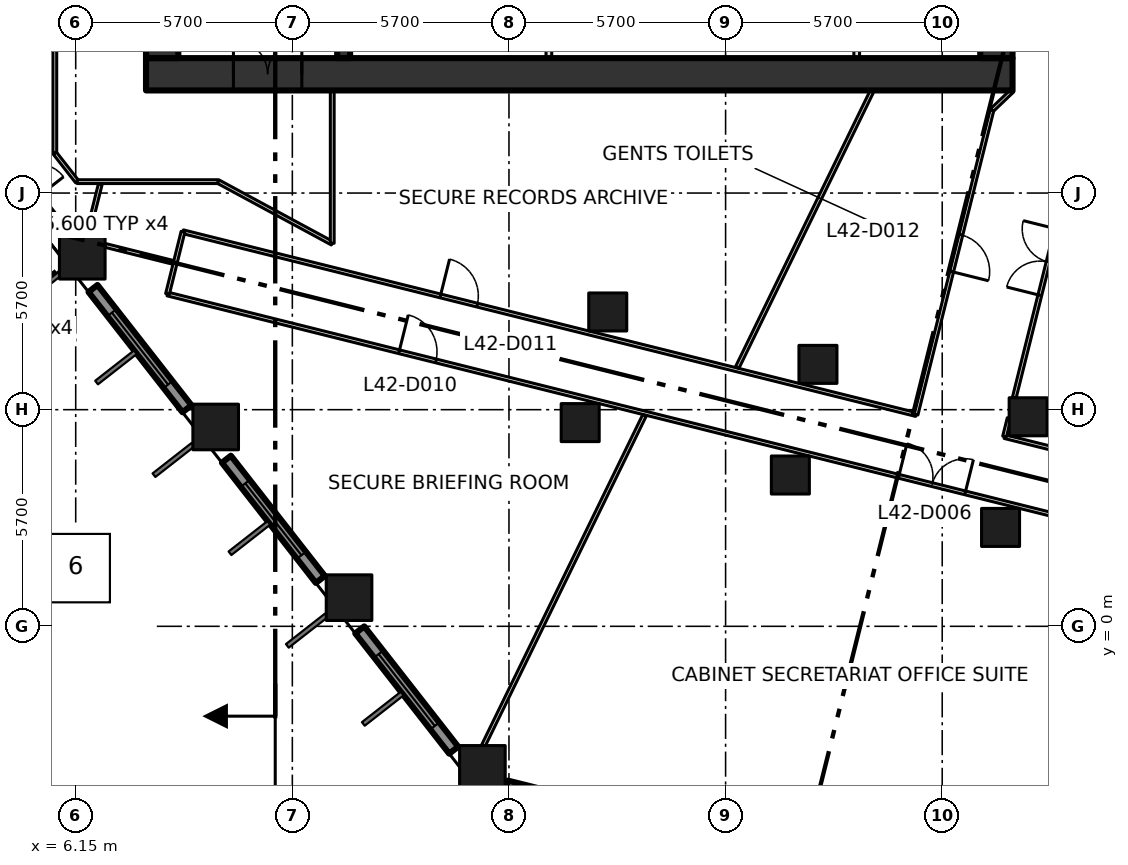
"""IFC4 building model, lengths in metres.
Left out: names, types, materials, properties, quantities, classifications, styles, units other than length and angle.
Written with IfcOpenShell. Run it as: python <this file> out.ifc"""

import sys

from ifc_helpers import new_model, si_unit, direction, frame, frame_2d, origin, origin_2d, place, context, subcontext, project, spatial, rectangle, extrude, element, fill, save


model = new_model("IFC4")
c1 = context("Model", 3, precision=1e-05, world=origin(), true_north=direction((0.0, 1.0)))
c2 = subcontext(c1, "Body", "Model", "MODEL_VIEW")
j1 = project(units=[si_unit("LENGTHUNIT", "METRE"), si_unit("PLANEANGLEUNIT", "RADIAN")], contexts=[c1])
p1 = place(None, origin())
s1 = spatial("IfcSite", under=j1, at=p1, CompositionType="ELEMENT")
p2 = place(p1, origin())
s2 = spatial("IfcBuilding", under=s1, at=p2, CompositionType="ELEMENT")
p3 = place(p2, frame((0.0, 0.0, 186.6)))
s3 = spatial("IfcBuildingStorey", under=s2, at=p3, CompositionType="ELEMENT", Elevation=186.6)
for number, where, z_axis, x_axis in (
    (1, (16.851, -3.738, 0.0), (0.0, 0.0, 1.0), (1.0, 0.0, 0.0)),
    (2, (13.342, 0.754, 0.0), (0.0, 0.0, 1.0), (1.0, 0.0, 0.0)),
    (3, (9.833, 5.245, 0.0), (0.0, 0.0, 1.0), (1.0, 0.0, 0.0)),
    (4, (6.323, 9.737, 0.0), (0.0, 0.0, 1.0), (1.0, 0.0, 0.0)),
):
    element("IfcColumn", number, at=place(p3, frame(where, z_axis=z_axis, x_axis=x_axis)), inside=s3, PredefinedType="COLUMN", context=c2, shape_type="SweptSolid", body=[
        extrude(rectangle(XDim=1.2, YDim=1.2, at=origin_2d()), origin(), (0.0, 0.0, 1.0), 4.2),
    ])
for number, where, z_axis, x_axis in (
    (5, (19.424, 5.36, 0.0), (0.0, 0.0, 1.0), (1.0, 0.0, 0.0)),
    (6, (24.954, 3.981, 0.0), (0.0, 0.0, 1.0), (1.0, 0.0, 0.0)),
    (7, (30.485, 2.602, 0.0), (0.0, 0.0, 1.0), (1.0, 0.0, 0.0)),
    (8, (20.149, 8.271, 0.0), (0.0, 0.0, 1.0), (1.0, 0.0, 0.0)),
    (9, (25.68, 6.892, 0.0), (0.0, 0.0, 1.0), (1.0, 0.0, 0.0)),
    (10, (31.211, 5.513, 0.0), (0.0, 0.0, 1.0), (1.0, 0.0, 0.0)),
):
    element("IfcColumn", number, at=place(p3, frame(where, z_axis=z_axis, x_axis=x_axis)), inside=s3, PredefinedType="COLUMN", context=c2, shape_type="SweptSolid", body=[
        extrude(rectangle(XDim=1.0, YDim=1.0, at=origin_2d()), origin(), (0.0, 0.0, 1.0), 4.2),
    ])
p4 = place(p3, frame((8.0, 14.525, -0.3), z_axis=(0.0, 0.0, 1.0), x_axis=(1.0, 0.0, 0.0)))
e11 = element("IfcWall", 11, at=p4, inside=s3, PredefinedType="SHEAR", context=c2, shape_type="SweptSolid", body=[
    extrude(rectangle(XDim=22.8, YDim=0.85, at=frame_2d((11.4, 0.0))), origin(), (0.0, 0.0, 1.0), 4.2),
])
p5 = place(p4, frame((2.3, 0.0, 0.3)))
e12 = element("IfcOpeningElement", 12, at=p5, cuts=e11, PredefinedType="OPENING", context=c2, shape_type="SweptSolid", body=[
    extrude(rectangle(XDim=1.8, YDim=2.1, at=frame_2d((0.9, 1.05))), frame((0.0, 0.435, 0.0), z_axis=(0.0, -1.0, 0.0), x_axis=(1.0, 0.0, 0.0)), (0.0, 0.0, 1.0), 0.87),
])
for number, where, z_axis, x_axis in (
    (13, (8.425, 14.95, -0.3), (0.0, 0.0, 1.0), (0.0, 1.0, 0.0)),
    (14, (30.375, 14.95, -0.3), (0.0, 0.0, 1.0), (0.0, 1.0, 0.0)),
):
    element("IfcWall", number, at=place(p3, frame(where, z_axis=z_axis, x_axis=x_axis)), inside=s3, PredefinedType="SHEAR", context=c2, shape_type="SweptSolid", body=[
        extrude(rectangle(XDim=20.75, YDim=0.85, at=frame_2d((10.375, 0.0))), origin(), (0.0, 0.0, 1.0), 4.2),
    ])
p6 = place(p3, frame((13.2, 14.95, 0.0), z_axis=(0.0, 0.0, 1.0), x_axis=(0.0, 1.0, 0.0)))
e15 = element("IfcWall", 15, at=p6, inside=s3, PredefinedType="SHEAR", context=c2, shape_type="SweptSolid", body=[
    extrude(rectangle(XDim=20.75, YDim=0.34, at=frame_2d((10.375, 0.0))), origin(), (0.0, 0.0, 1.0), 3.9),
])
p7 = place(p6, frame((3.35, 0.0, 0.0)))
e16 = element("IfcOpeningElement", 16, at=p7, cuts=e15, PredefinedType="OPENING", context=c2, shape_type="SweptSolid", body=[
    extrude(rectangle(XDim=1.8, YDim=2.1, at=frame_2d((0.9, 1.05))), frame((0.0, 0.18, 0.0), z_axis=(0.0, -1.0, 0.0), x_axis=(1.0, 0.0, 0.0)), (0.0, 0.0, 1.0), 0.36),
])
p8 = place(p6, frame((11.45, 0.0, 0.0)))
e17 = element("IfcOpeningElement", 17, at=p8, cuts=e15, PredefinedType="OPENING", context=c2, shape_type="SweptSolid", body=[
    extrude(rectangle(XDim=1.2, YDim=2.1, at=frame_2d((0.6, 1.05))), frame((0.0, 0.18, 0.0), z_axis=(0.0, -1.0, 0.0), x_axis=(1.0, 0.0, 0.0)), (0.0, 0.0, 1.0), 0.36),
])
for number, where, z_axis, x_axis in (
    (18, (18.6, 14.95, 0.0), (0.0, 0.0, 1.0), (0.0, 1.0, 0.0)),
    (19, (26.7, 14.95, 0.0), (0.0, 0.0, 1.0), (0.0, 1.0, 0.0)),
):
    element("IfcWall", number, at=place(p3, frame(where, z_axis=z_axis, x_axis=x_axis)), inside=s3, PredefinedType="PARTITIONING", context=c2, shape_type="SweptSolid", body=[
        extrude(rectangle(XDim=2.675, YDim=0.15, at=frame_2d((1.337, 0.0))), origin(), (0.0, 0.0, 1.0), 3.9),
    ])
p9 = place(p3, frame((3.283, 13.629, 0.0), z_axis=(0.0, 0.0, 1.0), x_axis=(0.615666723149, -0.78800665353, 0.0)))
e20 = element("IfcWall", 20, at=p9, inside=s3, PredefinedType="SOLIDWALL", context=c2, shape_type="SweptSolid", body=[
    extrude(rectangle(XDim=4.178, YDim=0.2, at=frame_2d((2.089, 0.0))), origin(), (0.0, 0.0, 1.0), 3.15),
])
p10 = place(p9, frame((1.188, 0.0, 0.0)))
e21 = element("IfcOpeningElement", 21, at=p10, cuts=e20, PredefinedType="OPENING", context=c2, shape_type="SweptSolid", body=[
    extrude(rectangle(XDim=1.8, YDim=2.9, at=frame_2d((0.9, 1.45))), frame((0.0, 0.11, 0.0), z_axis=(0.0, -1.0, 0.0), x_axis=(1.0, 0.0, 0.0)), (0.0, 0.0, 1.0), 0.22),
])
p11 = place(p3, frame((6.605, 8.889, 0.0), z_axis=(0.0, 0.0, 1.0), x_axis=(0.615706559089, -0.787975528233, 0.0)))
e22 = element("IfcWall", 22, at=p11, inside=s3, PredefinedType="SOLIDWALL", context=c2, shape_type="SweptSolid", body=[
    extrude(rectangle(XDim=4.016, YDim=0.3, at=frame_2d((2.008, 0.0))), origin(), (0.0, 0.0, 1.0), 3.15),
])
p12 = place(p11, frame((0.808, 0.0, 0.8)))
e23 = element("IfcOpeningElement", 23, at=p12, cuts=e22, PredefinedType="OPENING", context=c2, shape_type="SweptSolid", body=[
    extrude(rectangle(XDim=2.4, YDim=2.1, at=frame_2d((1.2, 1.05))), frame((0.0, 0.16, 0.0), z_axis=(0.0, -1.0, 0.0), x_axis=(1.0, 0.0, 0.0)), (0.0, 0.0, 1.0), 0.32),
])
p13 = place(p3, frame((10.115, 4.397, 0.0), z_axis=(0.0, 0.0, 1.0), x_axis=(0.615644041972, -0.788024373725, 0.0)))
e24 = element("IfcWall", 24, at=p13, inside=s3, PredefinedType="SOLIDWALL", context=c2, shape_type="SweptSolid", body=[
    extrude(rectangle(XDim=4.015, YDim=0.3, at=frame_2d((2.008, 0.0))), origin(), (0.0, 0.0, 1.0), 3.15),
])
p14 = place(p13, frame((0.807, 0.0, 0.8)))
e25 = element("IfcOpeningElement", 25, at=p14, cuts=e24, PredefinedType="OPENING", context=c2, shape_type="SweptSolid", body=[
    extrude(rectangle(XDim=2.4, YDim=2.1, at=frame_2d((1.2, 1.05))), frame((0.0, 0.16, 0.0), z_axis=(0.0, -1.0, 0.0), x_axis=(1.0, 0.0, 0.0)), (0.0, 0.0, 1.0), 0.32),
])
p15 = place(p3, frame((13.624, -0.094, 0.0), z_axis=(0.0, 0.0, 1.0), x_axis=(0.615526062586, -0.7881165309, 0.0)))
e26 = element("IfcWall", 26, at=p15, inside=s3, PredefinedType="SOLIDWALL", context=c2, shape_type="SweptSolid", body=[
    extrude(rectangle(XDim=4.016, YDim=0.3, at=frame_2d((2.008, 0.0))), origin(), (0.0, 0.0, 1.0), 3.15),
])
p16 = place(p15, frame((0.808, 0.0, 0.8)))
e27 = element("IfcOpeningElement", 27, at=p16, cuts=e26, PredefinedType="OPENING", context=c2, shape_type="SweptSolid", body=[
    extrude(rectangle(XDim=2.4, YDim=2.1, at=frame_2d((1.2, 1.05))), frame((0.0, 0.16, 0.0), z_axis=(0.0, -1.0, 0.0), x_axis=(1.0, 0.0, 0.0)), (0.0, 0.0, 1.0), 0.32),
])
p17 = place(p3, frame((17.484, -4.205, 0.0), z_axis=(0.0, 0.0, 1.0), x_axis=(0.970318118028, -0.241832069473, 0.0)))
e28 = element("IfcWall", 28, at=p17, inside=s3, PredefinedType="SOLIDWALL", context=c2, shape_type="SweptSolid", body=[
    extrude(rectangle(XDim=4.246, YDim=0.3, at=frame_2d((2.123, 0.0))), origin(), (0.0, 0.0, 1.0), 3.15),
])
p18 = place(p17, frame((0.923, 0.0, 0.8)))
e29 = element("IfcOpeningElement", 29, at=p18, cuts=e28, PredefinedType="OPENING", context=c2, shape_type="SweptSolid", body=[
    extrude(rectangle(XDim=2.4, YDim=2.1, at=frame_2d((1.2, 1.05))), frame((0.0, 0.16, 0.0), z_axis=(0.0, -1.0, 0.0), x_axis=(1.0, 0.0, 0.0)), (0.0, 0.0, 1.0), 0.32),
])
p19 = place(p3, frame((5.6, 12.451, 0.0), z_axis=(0.0, 0.0, 1.0), x_axis=(0.0, 1.0, 0.0)))
e30 = element("IfcWall", 30, at=p19, inside=s3, PredefinedType="PARTITIONING", context=c2, shape_type="SweptSolid", body=[
    extrude(rectangle(XDim=26.699, YDim=0.1, at=frame_2d((13.35, 0.0))), origin(), (0.0, 0.0, 1.0), 3.9),
])
p20 = place(p19, frame((7.17, 0.0, 0.0)))
e31 = element("IfcOpeningElement", 31, at=p20, cuts=e30, PredefinedType="OPENING", context=c2, shape_type="SweptSolid", body=[
    extrude(rectangle(XDim=1.0, YDim=2.1, at=frame_2d((0.5, 1.05))), frame((0.0, 0.06, 0.0), z_axis=(0.0, -1.0, 0.0), x_axis=(1.0, 0.0, 0.0)), (0.0, 0.0, 1.0), 0.12),
])
p21 = place(p19, frame((20.569, 0.0, 0.0)))
e32 = element("IfcOpeningElement", 32, at=p21, cuts=e30, PredefinedType="OPENING", context=c2, shape_type="SweptSolid", body=[
    extrude(rectangle(XDim=1.0, YDim=2.1, at=frame_2d((0.5, 1.05))), frame((0.0, 0.06, 0.0), z_axis=(0.0, -1.0, 0.0), x_axis=(1.0, 0.0, 0.0)), (0.0, 0.0, 1.0), 0.12),
])
p22 = place(p19, frame((24.979, 0.0, 0.0)))
e33 = element("IfcOpeningElement", 33, at=p22, cuts=e30, PredefinedType="OPENING", context=c2, shape_type="SweptSolid", body=[
    extrude(rectangle(XDim=1.0, YDim=2.1, at=frame_2d((0.5, 1.05))), frame((0.0, 0.06, 0.0), z_axis=(0.0, -1.0, 0.0), x_axis=(1.0, 0.0, 0.0)), (0.0, 0.0, 1.0), 0.12),
])
p23 = place(p3, frame((5.6, 12.451, 0.0), z_axis=(0.0, 0.0, 1.0), x_axis=(0.615783213621, -0.787915626081, 0.0)))
e34 = element("IfcWall", 34, at=p23, inside=s3, PredefinedType="PARTITIONING", context=c2, shape_type="SweptSolid", body=[
    extrude(rectangle(XDim=0.953, YDim=0.1, at=frame_2d((0.477, 0.0))), origin(), (0.0, 0.0, 1.0), 3.9),
])
p24 = place(p3, frame((6.187, 11.7, 0.0), z_axis=(0.0, 0.0, 1.0), x_axis=(1.0, 0.0, 0.0)))
e35 = element("IfcWall", 35, at=p24, inside=s3, PredefinedType="PARTITIONING", context=c2, shape_type="SweptSolid", body=[
    extrude(rectangle(XDim=3.713, YDim=0.1, at=frame_2d((1.856, 0.0))), origin(), (0.0, 0.0, 1.0), 3.9),
])
p25 = place(p3, frame((8.565, 8.744, 0.0), z_axis=(0.0, 0.0, 1.0), x_axis=(0.97029693432, -0.24191705035, 0.0)))
e36 = element("IfcWall", 36, at=p25, inside=s3, PredefinedType="PARTITIONING", context=c2, shape_type="SweptSolid", body=[
    extrude(rectangle(XDim=56.375, YDim=0.1, at=frame_2d((28.187, 0.0))), origin(), (0.0, 0.0, 1.0), 3.9),
])
p26 = place(p25, frame((37.03, 0.0, 0.0)))
e37 = element("IfcOpeningElement", 37, at=p26, cuts=e36, PredefinedType="OPENING", context=c2, shape_type="SweptSolid", body=[
    extrude(rectangle(XDim=1.8, YDim=2.1, at=frame_2d((0.9, 1.05))), frame((0.0, 0.06, 0.0), z_axis=(0.0, -1.0, 0.0), x_axis=(1.0, 0.0, 0.0)), (0.0, 0.0, 1.0), 0.12),
])
p27 = place(p25, frame((42.83, 0.0, 0.0)))
e38 = element("IfcOpeningElement", 38, at=p27, cuts=e36, PredefinedType="OPENING", context=c2, shape_type="SweptSolid", body=[
    extrude(rectangle(XDim=1.0, YDim=2.1, at=frame_2d((0.5, 1.05))), frame((0.0, 0.06, 0.0), z_axis=(0.0, -1.0, 0.0), x_axis=(1.0, 0.0, 0.0)), (0.0, 0.0, 1.0), 0.12),
])
p28 = place(p25, frame((19.831, 0.0, 0.0)))
e39 = element("IfcOpeningElement", 39, at=p28, cuts=e36, PredefinedType="OPENING", context=c2, shape_type="SweptSolid", body=[
    extrude(rectangle(XDim=1.8, YDim=2.1, at=frame_2d((0.9, 1.05))), frame((0.0, 0.06, 0.0), z_axis=(0.0, -1.0, 0.0), x_axis=(1.0, 0.0, 0.0)), (0.0, 0.0, 1.0), 0.12),
])
p29 = place(p25, frame((25.631, 0.0, 0.0)))
e40 = element("IfcOpeningElement", 40, at=p29, cuts=e36, PredefinedType="OPENING", context=c2, shape_type="SweptSolid", body=[
    extrude(rectangle(XDim=1.0, YDim=2.1, at=frame_2d((0.5, 1.05))), frame((0.0, 0.06, 0.0), z_axis=(0.0, -1.0, 0.0), x_axis=(1.0, 0.0, 0.0)), (0.0, 0.0, 1.0), 0.12),
])
p30 = place(p25, frame((6.28, 0.0, 0.0)))
e41 = element("IfcOpeningElement", 41, at=p30, cuts=e36, PredefinedType="OPENING", context=c2, shape_type="SweptSolid", body=[
    extrude(rectangle(XDim=1.0, YDim=2.1, at=frame_2d((0.5, 1.05))), frame((0.0, 0.06, 0.0), z_axis=(0.0, -1.0, 0.0), x_axis=(1.0, 0.0, 0.0)), (0.0, 0.0, 1.0), 0.12),
])
p31 = place(p3, frame((8.973, 10.382, 0.0), z_axis=(0.0, 0.0, 1.0), x_axis=(0.970286808807, -0.241957658808, 0.0)))
e42 = element("IfcWall", 42, at=p31, inside=s3, PredefinedType="PARTITIONING", context=c2, shape_type="SweptSolid", body=[
    extrude(rectangle(XDim=19.88, YDim=0.1, at=frame_2d((9.94, 0.0))), origin(), (0.0, 0.0, 1.0), 3.9),
])
p32 = place(p31, frame((6.98, 0.0, 0.0)))
e43 = element("IfcOpeningElement", 43, at=p32, cuts=e42, PredefinedType="OPENING", context=c2, shape_type="SweptSolid", body=[
    extrude(rectangle(XDim=1.0, YDim=2.1, at=frame_2d((0.5, 1.05))), frame((0.0, 0.06, 0.0), z_axis=(0.0, -1.0, 0.0), x_axis=(1.0, 0.0, 0.0)), (0.0, 0.0, 1.0), 0.12),
])
p33 = place(p3, frame((8.973, 10.382, 0.0), z_axis=(0.0, 0.0, 1.0), x_axis=(-0.241650823739, -0.970363271866, 0.0)))
e44 = element("IfcWall", 44, at=p33, inside=s3, PredefinedType="PARTITIONING", context=c2, shape_type="SweptSolid", body=[
    extrude(rectangle(XDim=1.688, YDim=0.1, at=frame_2d((0.844, 0.0))), origin(), (0.0, 0.0, 1.0), 3.9),
])
p34 = place(p3, frame((9.9, 11.7, 0.0), z_axis=(0.0, 0.0, 1.0), x_axis=(0.87965147249, -0.475618846291, 0.0)))
e45 = element("IfcWall", 45, at=p34, inside=s3, PredefinedType="PARTITIONING", context=c2, shape_type="SweptSolid", body=[
    extrude(rectangle(XDim=3.41, YDim=0.1, at=frame_2d((1.705, 0.0))), origin(), (0.0, 0.0, 1.0), 3.9),
])
p35 = place(p3, frame((12.9, 10.078, 0.0), z_axis=(0.0, 0.0, 1.0), x_axis=(0.0, 1.0, 0.0)))
e46 = element("IfcWall", 46, at=p35, inside=s3, PredefinedType="PARTITIONING", context=c2, shape_type="SweptSolid", body=[
    extrude(rectangle(XDim=4.022, YDim=0.1, at=frame_2d((2.011, 0.0))), origin(), (0.0, 0.0, 1.0), 3.9),
])
p36 = place(p3, frame((30.259, 13.583, 0.0), z_axis=(0.0, 0.0, 1.0), x_axis=(-0.241888494143, -0.970304053584, 0.0)))
e47 = element("IfcWall", 47, at=p36, inside=s3, PredefinedType="PARTITIONING", context=c2, shape_type="SweptSolid", body=[
    extrude(rectangle(XDim=8.256, YDim=0.1, at=frame_2d((4.128, 0.0))), origin(), (0.0, 0.0, 1.0), 3.9),
])
p37 = place(p36, frame((3.38, 0.0, 0.0)))
e48 = element("IfcOpeningElement", 48, at=p37, cuts=e47, PredefinedType="OPENING", context=c2, shape_type="SweptSolid", body=[
    extrude(rectangle(XDim=1.0, YDim=2.1, at=frame_2d((0.5, 1.05))), frame((0.0, 0.06, 0.0), z_axis=(0.0, -1.0, 0.0), x_axis=(1.0, 0.0, 0.0)), (0.0, 0.0, 1.0), 0.12),
])
p38 = place(p3, frame((30.59, 4.992, 0.0), z_axis=(0.0, 0.0, 1.0), x_axis=(0.97028916255, -0.241948219746, 0.0)))
e49 = element("IfcWall", 49, at=p38, inside=s3, PredefinedType="PARTITIONING", context=c2, shape_type="SweptSolid", body=[
    extrude(rectangle(XDim=25.526, YDim=0.1, at=frame_2d((12.763, 0.0))), origin(), (0.0, 0.0, 1.0), 3.9),
])
p39 = place(p38, frame((20.101, 0.0, 0.0)))
e50 = element("IfcOpeningElement", 50, at=p39, cuts=e49, PredefinedType="OPENING", context=c2, shape_type="SweptSolid", body=[
    extrude(rectangle(XDim=1.0, YDim=2.1, at=frame_2d((0.5, 1.05))), frame((0.0, 0.06, 0.0), z_axis=(0.0, -1.0, 0.0), x_axis=(1.0, 0.0, 0.0)), (0.0, 0.0, 1.0), 0.12),
])
p40 = place(p3, frame((30.59, 4.992, 0.0), z_axis=(0.0, 0.0, 1.0), x_axis=(0.241731207299, 0.970343250308, 0.0)))
e51 = element("IfcWall", 51, at=p40, inside=s3, PredefinedType="PARTITIONING", context=c2, shape_type="SweptSolid", body=[
    extrude(rectangle(XDim=0.5, YDim=0.1, at=frame_2d((0.25, 0.0))), origin(), (0.0, 0.0, 1.0), 3.9),
])
p41 = place(p3, frame((30.8, 14.1, 0.0), z_axis=(0.0, 0.0, 1.0), x_axis=(-0.722911025189, -0.690941133281, 0.0)))
e52 = element("IfcWall", 52, at=p41, inside=s3, PredefinedType="PARTITIONING", context=c2, shape_type="SweptSolid", body=[
    extrude(rectangle(XDim=0.748, YDim=0.1, at=frame_2d((0.374, 0.0))), origin(), (0.0, 0.0, 1.0), 3.9),
])
p42 = place(p3, frame((30.845, 6.013, 0.0), z_axis=(0.0, 0.0, 1.0), x_axis=(0.241969354343, 0.97028389225, 0.0)))
e53 = element("IfcWall", 53, at=p42, inside=s3, PredefinedType="PARTITIONING", context=c2, shape_type="SweptSolid", body=[
    extrude(rectangle(XDim=7.203, YDim=0.1, at=frame_2d((3.602, 0.0))), origin(), (0.0, 0.0, 1.0), 3.9),
])
p43 = place(p42, frame((2.78, 0.0, 0.0)))
e54 = element("IfcOpeningElement", 54, at=p43, cuts=e53, PredefinedType="OPENING", context=c2, shape_type="SweptSolid", body=[
    extrude(rectangle(XDim=1.8, YDim=2.1, at=frame_2d((0.9, 1.05))), frame((0.0, 0.06, 0.0), z_axis=(0.0, -1.0, 0.0), x_axis=(1.0, 0.0, 0.0)), (0.0, 0.0, 1.0), 0.12),
])
p44 = place(p3, frame((6.797, 11.638, 0.0), z_axis=(0.0, 0.0, 1.0), x_axis=(-0.242492789119, -0.97015320812, 0.0)))
e55 = element("IfcWall", 55, at=p44, inside=s3, PredefinedType="PARTITIONING", context=c2, shape_type="SweptSolid", body=[
    extrude(rectangle(XDim=1.341, YDim=0.1, at=frame_2d((0.67, 0.0))), origin(), (0.0, 0.0, 1.0), 3.9),
])
p45 = place(p3, frame((8.72, 9.574, 0.0), z_axis=(0.0, 0.0, 1.0), x_axis=(-0.97017350799, 0.242411559945, 0.0)))
e56 = element("IfcWall", 56, at=p45, inside=s3, PredefinedType="PARTITIONING", context=c2, shape_type="SweptSolid", body=[
    extrude(rectangle(XDim=1.852, YDim=0.1, at=frame_2d((0.926, 0.0))), origin(), (0.0, 0.0, 1.0), 3.9),
])
p46 = place(p3, frame((16.877, -3.138, 0.0), z_axis=(0.0, 0.0, 1.0), x_axis=(0.438466907108, 0.898747334556, 0.0)))
e57 = element("IfcWall", 57, at=p46, inside=s3, PredefinedType="PARTITIONING", context=c2, shape_type="SweptSolid", body=[
    extrude(rectangle(XDim=9.67, YDim=0.1, at=frame_2d((4.835, 0.0))), origin(), (0.0, 0.0, 1.0), 3.9),
])
p47 = place(p3, frame((23.555, 6.808, 0.0), z_axis=(0.0, 0.0, 1.0), x_axis=(0.438332324522, 0.898812980146, 0.0)))
e58 = element("IfcWall", 58, at=p47, inside=s3, PredefinedType="PARTITIONING", context=c2, shape_type="SweptSolid", body=[
    extrude(rectangle(XDim=8.113, YDim=0.1, at=frame_2d((4.056, 0.0))), origin(), (0.0, 0.0, 1.0), 3.9),
])
p48 = place(p5, origin())
e59 = element("IfcDoor", 59, at=p48, inside=s3, OperationType="DOUBLE_DOOR_SINGLE_SWING", PredefinedType="DOOR", context=c2, shape_type="SweptSolid", body=[
    extrude(rectangle(XDim=1.8, YDim=2.1, at=frame_2d((0.9, 1.05))), frame((0.0, 0.025, 0.0), z_axis=(0.0, -1.0, 0.0), x_axis=(1.0, 0.0, 0.0)), (0.0, 0.0, 1.0), 0.05),
])
fill(e12, e59)
p49 = place(p12, origin())
e60 = element("IfcWindow", 60, at=p49, inside=s3, PartitioningType="DOUBLE_PANEL_VERTICAL", PredefinedType="WINDOW", context=c2, shape_type="SweptSolid", body=[
    extrude(rectangle(XDim=2.4, YDim=2.1, at=frame_2d((1.2, 1.05))), frame((0.0, 0.03, 0.0), z_axis=(0.0, -1.0, 0.0), x_axis=(1.0, 0.0, 0.0)), (0.0, 0.0, 1.0), 0.06),
])
fill(e23, e60)
p50 = place(p14, origin())
e61 = element("IfcWindow", 61, at=p50, inside=s3, PartitioningType="DOUBLE_PANEL_VERTICAL", PredefinedType="WINDOW", context=c2, shape_type="SweptSolid", body=[
    extrude(rectangle(XDim=2.4, YDim=2.1, at=frame_2d((1.2, 1.05))), frame((0.0, 0.03, 0.0), z_axis=(0.0, -1.0, 0.0), x_axis=(1.0, 0.0, 0.0)), (0.0, 0.0, 1.0), 0.06),
])
fill(e25, e61)
p51 = place(p16, origin())
e62 = element("IfcWindow", 62, at=p51, inside=s3, PartitioningType="DOUBLE_PANEL_VERTICAL", PredefinedType="WINDOW", context=c2, shape_type="SweptSolid", body=[
    extrude(rectangle(XDim=2.4, YDim=2.1, at=frame_2d((1.2, 1.05))), frame((0.0, 0.03, 0.0), z_axis=(0.0, -1.0, 0.0), x_axis=(1.0, 0.0, 0.0)), (0.0, 0.0, 1.0), 0.06),
])
fill(e27, e62)
p52 = place(p28, origin())
e63 = element("IfcDoor", 63, at=p52, inside=s3, OperationType="DOUBLE_DOOR_SINGLE_SWING", PredefinedType="DOOR", context=c2, shape_type="SweptSolid", body=[
    extrude(rectangle(XDim=1.8, YDim=2.1, at=frame_2d((0.9, 1.05))), frame((0.0, 0.025, 0.0), z_axis=(0.0, -1.0, 0.0), x_axis=(1.0, 0.0, 0.0)), (0.0, 0.0, 1.0), 0.05),
])
fill(e39, e63)
p53 = place(p30, origin())
e64 = element("IfcDoor", 64, at=p53, inside=s3, OperationType="SINGLE_SWING_LEFT", PredefinedType="DOOR", context=c2, shape_type="SweptSolid", body=[
    extrude(rectangle(XDim=1.0, YDim=2.1, at=frame_2d((0.5, 1.05))), frame((0.0, 0.025, 0.0), z_axis=(0.0, -1.0, 0.0), x_axis=(1.0, 0.0, 0.0)), (0.0, 0.0, 1.0), 0.05),
])
fill(e41, e64)
p54 = place(p32, origin())
e65 = element("IfcDoor", 65, at=p54, inside=s3, OperationType="SINGLE_SWING_LEFT", PredefinedType="DOOR", context=c2, shape_type="SweptSolid", body=[
    extrude(rectangle(XDim=1.0, YDim=2.1, at=frame_2d((0.5, 1.05))), frame((0.0, 0.025, 0.0), z_axis=(0.0, -1.0, 0.0), x_axis=(1.0, 0.0, 0.0)), (0.0, 0.0, 1.0), 0.05),
])
fill(e43, e65)
p55 = place(p37, origin())
e66 = element("IfcDoor", 66, at=p55, inside=s3, OperationType="SINGLE_SWING_RIGHT", PredefinedType="DOOR", context=c2, shape_type="SweptSolid", body=[
    extrude(rectangle(XDim=1.0, YDim=2.1, at=frame_2d((0.5, 1.05))), frame((0.0, 0.025, 0.0), z_axis=(0.0, -1.0, 0.0), x_axis=(1.0, 0.0, 0.0)), (0.0, 0.0, 1.0), 0.05),
])
fill(e48, e66)
p56 = place(p43, origin())
e67 = element("IfcDoor", 67, at=p56, inside=s3, OperationType="DOUBLE_DOOR_SINGLE_SWING", PredefinedType="DOOR", context=c2, shape_type="SweptSolid", body=[
    extrude(rectangle(XDim=1.8, YDim=2.1, at=frame_2d((0.9, 1.05))), frame((0.0, 0.025, 0.0), z_axis=(0.0, -1.0, 0.0), x_axis=(1.0, 0.0, 0.0)), (0.0, 0.0, 1.0), 0.05),
])
fill(e54, e67)
save(model, sys.argv[1])
